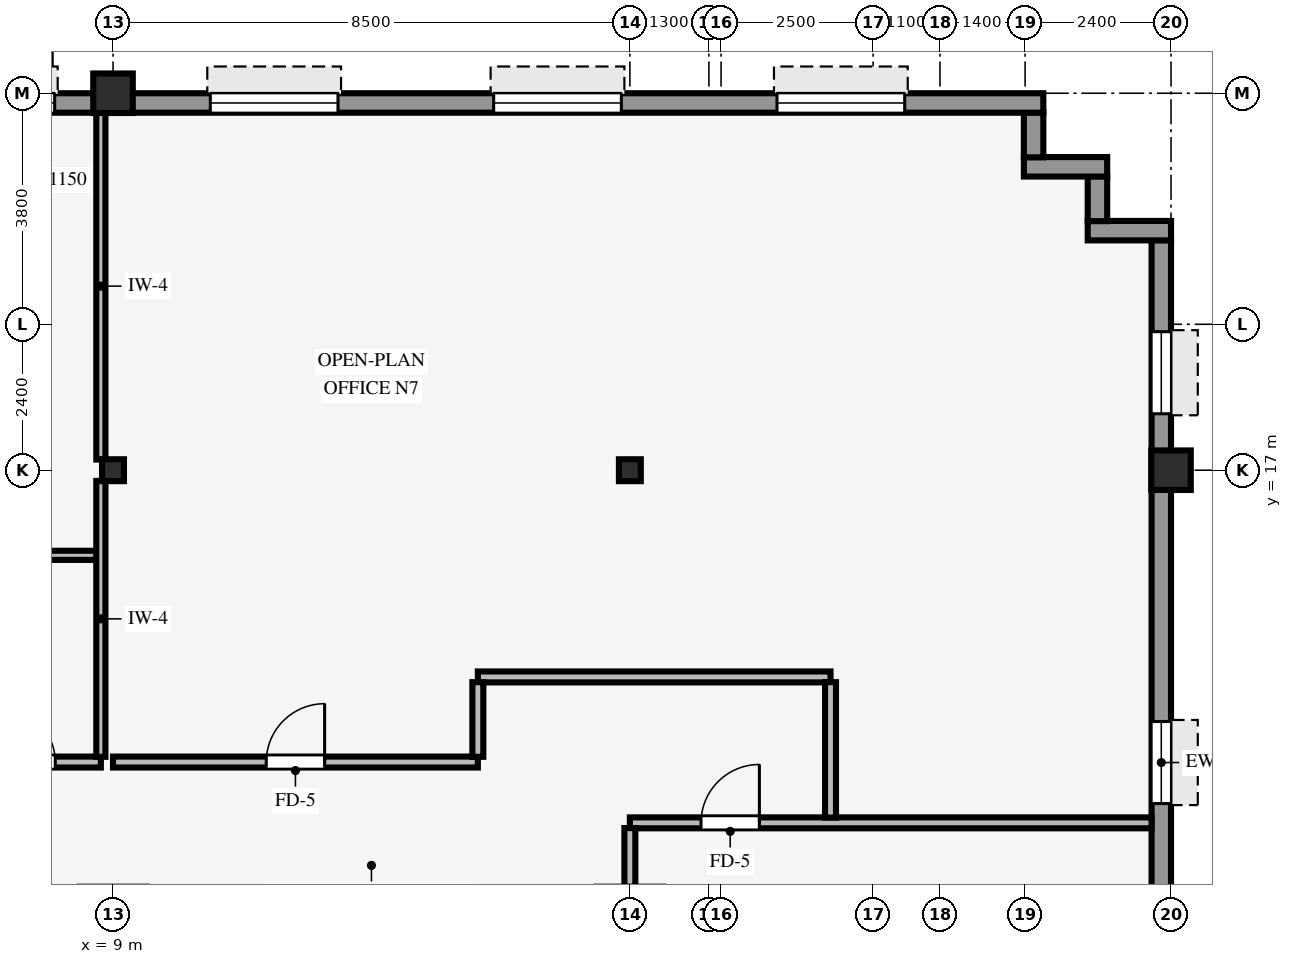
"""IFC4 building model, lengths in metres.
Left out: names, types, materials, properties, quantities, classifications, styles, units other than length and angle.
Written with IfcOpenShell. Run it as: python <this file> out.ifc"""

import sys

from ifc_helpers import new_model, si_unit, direction, frame, frame_2d, origin, origin_2d, place, context, subcontext, project, spatial, rectangle, hollow_rectangle, i_section, extrude, source, transform, mapped, element, fill, save


model = new_model("IFC4")
c1 = context("Model", 3, precision=1e-05, world=origin(), true_north=direction((0.0, 1.0)))
c2 = subcontext(c1, "Body", "Model", "MODEL_VIEW")
j1 = project(units=[si_unit("LENGTHUNIT", "METRE"), si_unit("PLANEANGLEUNIT", "RADIAN")], contexts=[c1])
p1 = place(None, origin())
s1 = spatial("IfcSite", under=j1, at=p1, CompositionType="ELEMENT")
p2 = place(p1, origin())
s2 = spatial("IfcBuilding", under=s1, at=p2, CompositionType="ELEMENT")
p3 = place(p2, frame((0.0, 0.0, 116.55)))
s3 = spatial("IfcBuildingStorey", under=s2, at=p3, CompositionType="ELEMENT", Elevation=116.55)
p4 = place(p3, frame((26.4, 17.0, -0.4), z_axis=(0.0, 0.0, 1.0), x_axis=(1.0, 0.0, 0.0)))
e1 = element("IfcColumn", 1, at=p4, inside=s3, PredefinedType="COLUMN", context=c2, shape_type="SweptSolid", body=[
    extrude(hollow_rectangle(XDim=0.65, YDim=0.65, WallThickness=0.04, InnerFilletRadius=0.04, OuterFilletRadius=0.08, at=origin_2d()), origin(), (0.0, 0.0, 1.0), 3.77),
])
p5 = place(p3, frame((9.0, 23.2, 0.0), z_axis=(0.0, 0.0, 1.0), x_axis=(1.0, 0.0, 0.0)))
e2 = element("IfcColumn", 2, at=p5, inside=s3, PredefinedType="COLUMN", context=c2, shape_type="SweptSolid", body=[
    extrude(hollow_rectangle(XDim=0.65, YDim=0.65, WallThickness=0.04, InnerFilletRadius=0.04, OuterFilletRadius=0.08, at=origin_2d()), origin(), (0.0, 0.0, 1.0), 3.37),
])
for number, where, z_axis, x_axis in (
    (3, (9.0, 17.0, 0.0), (0.0, 0.0, 1.0), (1.0, 0.0, 0.0)),
    (4, (17.5, 17.0, 0.0), (0.0, 0.0, 1.0), (1.0, 0.0, 0.0)),
):
    element("IfcColumn", number, at=place(p3, frame(where, z_axis=z_axis, x_axis=x_axis)), inside=s3, PredefinedType="COLUMN", context=c2, shape_type="SweptSolid", body=[
        extrude(i_section(OverallWidth=0.36, OverallDepth=0.36, WebThickness=0.021, FlangeThickness=0.021, FilletRadius=0.018, at=origin_2d()), origin(), (0.0, 0.0, 1.0), 3.37),
    ])
p6 = place(p3, frame((26.24, 3.6, 0.0), z_axis=(0.0, 0.0, 1.0), x_axis=(0.0, 1.0, 0.0)))
e5 = element("IfcWall", 5, at=p6, inside=s3, PredefinedType="STANDARD", context=c2, shape_type="SweptSolid", body=[
    extrude(rectangle(XDim=17.184, YDim=0.32, at=frame_2d((8.592, 0.0))), origin(), (0.0, 0.0, 1.0), 2.705),
])
p7 = place(p6, frame((2.856, 0.0, 0.8)))
e6 = element("IfcOpeningElement", 6, at=p7, cuts=e5, PredefinedType="OPENING", context=c2, shape_type="SweptSolid", body=[
    extrude(rectangle(XDim=1.35, YDim=1.56, at=frame_2d((0.675, 0.78))), frame((0.0, 0.17, 0.0), z_axis=(0.0, -1.0, 0.0), x_axis=(1.0, 0.0, 0.0)), (0.0, 0.0, 1.0), 0.34),
])
p8 = place(p6, frame((7.917, 0.0, 0.8)))
e7 = element("IfcOpeningElement", 7, at=p8, cuts=e5, PredefinedType="OPENING", context=c2, shape_type="SweptSolid", body=[
    extrude(rectangle(XDim=1.35, YDim=1.56, at=frame_2d((0.675, 0.78))), frame((0.0, 0.17, 0.0), z_axis=(0.0, -1.0, 0.0), x_axis=(1.0, 0.0, 0.0)), (0.0, 0.0, 1.0), 0.34),
])
p9 = place(p6, frame((14.328, 0.0, 0.8)))
e8 = element("IfcOpeningElement", 8, at=p9, cuts=e5, PredefinedType="OPENING", context=c2, shape_type="SweptSolid", body=[
    extrude(rectangle(XDim=1.35, YDim=1.56, at=frame_2d((0.675, 0.78))), frame((0.0, 0.17, 0.0), z_axis=(0.0, -1.0, 0.0), x_axis=(1.0, 0.0, 0.0)), (0.0, 0.0, 1.0), 0.34),
])
p10 = place(p3, frame((25.03, 20.94, 0.0), z_axis=(0.0, 0.0, 1.0), x_axis=(1.0, 0.0, 0.0)))
e9 = element("IfcWall", 9, at=p10, inside=s3, PredefinedType="STANDARD", context=c2, shape_type="SweptSolid", body=[
    extrude(rectangle(XDim=1.37, YDim=0.32, at=frame_2d((0.685, 0.0))), origin(), (0.0, 0.0, 1.0), 3.36),
])
p11 = place(p3, frame((25.19, 21.096, 0.0), z_axis=(0.0, 0.0, 1.0), x_axis=(0.0, 1.0, 0.0)))
e10 = element("IfcWall", 10, at=p11, inside=s3, PredefinedType="STANDARD", context=c2, shape_type="SweptSolid", body=[
    extrude(rectangle(XDim=0.738, YDim=0.32, at=frame_2d((0.369, 0.0))), origin(), (0.0, 0.0, 1.0), 3.36),
])
p12 = place(p3, frame((23.98, 21.99, 0.0), z_axis=(0.0, 0.0, 1.0), x_axis=(1.0, 0.0, 0.0)))
e11 = element("IfcWall", 11, at=p12, inside=s3, PredefinedType="STANDARD", context=c2, shape_type="SweptSolid", body=[
    extrude(rectangle(XDim=1.37, YDim=0.32, at=frame_2d((0.685, 0.0))), origin(), (0.0, 0.0, 1.0), 3.36),
])
p13 = place(p3, frame((24.14, 22.146, 0.0), z_axis=(0.0, 0.0, 1.0), x_axis=(0.0, 1.0, 0.0)))
e12 = element("IfcWall", 12, at=p13, inside=s3, PredefinedType="STANDARD", context=c2, shape_type="SweptSolid", body=[
    extrude(rectangle(XDim=0.738, YDim=0.32, at=frame_2d((0.369, 0.0))), origin(), (0.0, 0.0, 1.0), 3.36),
])
p14 = place(p3, frame((-24.3, 23.04, 0.0), z_axis=(0.0, 0.0, 1.0), x_axis=(1.0, 0.0, 0.0)))
e13 = element("IfcWall", 13, at=p14, inside=s3, PredefinedType="STANDARD", context=c2, shape_type="SweptSolid", body=[
    extrude(rectangle(XDim=48.6, YDim=0.32, at=frame_2d((24.3, 0.0))), origin(), (0.0, 0.0, 1.0), 2.705),
])
p15 = place(p14, frame((28.5, 0.0, 0.0)))
e14 = element("IfcOpeningElement", 14, at=p15, cuts=e13, PredefinedType="OPENING", context=c2, shape_type="SweptSolid", body=[
    extrude(rectangle(XDim=1.05, YDim=2.1, at=frame_2d((0.525, 1.05))), frame((0.0, 0.17, 0.0), z_axis=(0.0, -1.0, 0.0), x_axis=(1.0, 0.0, 0.0)), (0.0, 0.0, 1.0), 0.34),
])
p16 = place(p14, frame((2.73, 0.0, 0.8)))
e15 = element("IfcOpeningElement", 15, at=p16, cuts=e13, PredefinedType="OPENING", context=c2, shape_type="SweptSolid", body=[
    extrude(rectangle(XDim=2.1, YDim=1.56, at=frame_2d((1.05, 0.78))), frame((0.0, 0.17, 0.0), z_axis=(0.0, -1.0, 0.0), x_axis=(1.0, 0.0, 0.0)), (0.0, 0.0, 1.0), 0.34),
])
p17 = place(p14, frame((7.84, 0.0, 0.8)))
e16 = element("IfcOpeningElement", 16, at=p17, cuts=e13, PredefinedType="OPENING", context=c2, shape_type="SweptSolid", body=[
    extrude(rectangle(XDim=2.1, YDim=1.56, at=frame_2d((1.05, 0.78))), frame((0.0, 0.17, 0.0), z_axis=(0.0, -1.0, 0.0), x_axis=(1.0, 0.0, 0.0)), (0.0, 0.0, 1.0), 0.34),
])
p18 = place(p14, frame((20.92, 0.0, 0.8)))
e17 = element("IfcOpeningElement", 17, at=p18, cuts=e13, PredefinedType="OPENING", context=c2, shape_type="SweptSolid", body=[
    extrude(rectangle(XDim=2.1, YDim=1.56, at=frame_2d((1.05, 0.78))), frame((0.0, 0.17, 0.0), z_axis=(0.0, -1.0, 0.0), x_axis=(1.0, 0.0, 0.0)), (0.0, 0.0, 1.0), 0.34),
])
p19 = place(p14, frame((25.58, 0.0, 0.8)))
e18 = element("IfcOpeningElement", 18, at=p19, cuts=e13, PredefinedType="OPENING", context=c2, shape_type="SweptSolid", body=[
    extrude(rectangle(XDim=2.1, YDim=1.56, at=frame_2d((1.05, 0.78))), frame((0.0, 0.17, 0.0), z_axis=(0.0, -1.0, 0.0), x_axis=(1.0, 0.0, 0.0)), (0.0, 0.0, 1.0), 0.34),
])
p20 = place(p14, frame((30.24, 0.0, 0.8)))
e19 = element("IfcOpeningElement", 19, at=p20, cuts=e13, PredefinedType="OPENING", context=c2, shape_type="SweptSolid", body=[
    extrude(rectangle(XDim=2.1, YDim=1.56, at=frame_2d((1.05, 0.78))), frame((0.0, 0.17, 0.0), z_axis=(0.0, -1.0, 0.0), x_axis=(1.0, 0.0, 0.0)), (0.0, 0.0, 1.0), 0.34),
])
p21 = place(p14, frame((34.9, 0.0, 0.8)))
e20 = element("IfcOpeningElement", 20, at=p21, cuts=e13, PredefinedType="OPENING", context=c2, shape_type="SweptSolid", body=[
    extrude(rectangle(XDim=2.1, YDim=1.56, at=frame_2d((1.05, 0.78))), frame((0.0, 0.17, 0.0), z_axis=(0.0, -1.0, 0.0), x_axis=(1.0, 0.0, 0.0)), (0.0, 0.0, 1.0), 0.34),
])
p22 = place(p14, frame((39.56, 0.0, 0.8)))
e21 = element("IfcOpeningElement", 21, at=p22, cuts=e13, PredefinedType="OPENING", context=c2, shape_type="SweptSolid", body=[
    extrude(rectangle(XDim=2.1, YDim=1.56, at=frame_2d((1.05, 0.78))), frame((0.0, 0.17, 0.0), z_axis=(0.0, -1.0, 0.0), x_axis=(1.0, 0.0, 0.0)), (0.0, 0.0, 1.0), 0.34),
])
p23 = place(p14, frame((44.22, 0.0, 0.8)))
e22 = element("IfcOpeningElement", 22, at=p23, cuts=e13, PredefinedType="OPENING", context=c2, shape_type="SweptSolid", body=[
    extrude(rectangle(XDim=2.1, YDim=1.56, at=frame_2d((1.05, 0.78))), frame((0.0, 0.17, 0.0), z_axis=(0.0, -1.0, 0.0), x_axis=(1.0, 0.0, 0.0)), (0.0, 0.0, 1.0), 0.34),
])
p24 = place(p3, frame((17.5, 11.2, 0.0), z_axis=(0.0, 0.0, 1.0), x_axis=(1.0, 0.0, 0.0)))
e23 = element("IfcWall", 23, at=p24, inside=s3, PredefinedType="PARTITIONING", context=c2, shape_type="SweptSolid", body=[
    extrude(rectangle(XDim=8.58, YDim=0.18, at=frame_2d((4.29, 0.0))), origin(), (0.0, 0.0, 1.0), 3.36),
])
p25 = place(p24, frame((1.17, 0.0, 0.0)))
e24 = element("IfcOpeningElement", 24, at=p25, cuts=e23, PredefinedType="OPENING", context=c2, shape_type="SweptSolid", body=[
    extrude(rectangle(XDim=0.96, YDim=2.1, at=frame_2d((0.48, 1.05))), frame((0.0, 0.1, 0.0), z_axis=(0.0, -1.0, 0.0), x_axis=(1.0, 0.0, 0.0)), (0.0, 0.0, 1.0), 0.2),
])
p26 = place(p3, frame((-15.0, 12.2, 0.0), z_axis=(0.0, 0.0, 1.0), x_axis=(1.0, 0.0, 0.0)))
e25 = element("IfcWall", 25, at=p26, inside=s3, PredefinedType="PARTITIONING", context=c2, shape_type="SweptSolid", body=[
    extrude(rectangle(XDim=23.8, YDim=0.18, at=frame_2d((11.9, 0.0))), origin(), (0.0, 0.0, 1.0), 3.36),
])
p27 = place(p26, frame((5.525, 0.0, 0.0)))
e26 = element("IfcOpeningElement", 26, at=p27, cuts=e25, PredefinedType="OPENING", context=c2, shape_type="SweptSolid", body=[
    extrude(rectangle(XDim=0.96, YDim=2.1, at=frame_2d((0.48, 1.05))), frame((0.0, 0.1, 0.0), z_axis=(0.0, -1.0, 0.0), x_axis=(1.0, 0.0, 0.0)), (0.0, 0.0, 1.0), 0.2),
])
p28 = place(p26, frame((1.115, 0.0, 0.0)))
e27 = element("IfcOpeningElement", 27, at=p28, cuts=e25, PredefinedType="OPENING", context=c2, shape_type="SweptSolid", body=[
    extrude(rectangle(XDim=0.96, YDim=2.1, at=frame_2d((0.48, 1.05))), frame((0.0, 0.1, 0.0), z_axis=(0.0, -1.0, 0.0), x_axis=(1.0, 0.0, 0.0)), (0.0, 0.0, 1.0), 0.2),
])
p29 = place(p26, frame((9.83, 0.0, 0.0)))
e28 = element("IfcOpeningElement", 28, at=p29, cuts=e25, PredefinedType="OPENING", context=c2, shape_type="SweptSolid", body=[
    extrude(rectangle(XDim=0.96, YDim=2.1, at=frame_2d((0.48, 1.05))), frame((0.0, 0.1, 0.0), z_axis=(0.0, -1.0, 0.0), x_axis=(1.0, 0.0, 0.0)), (0.0, 0.0, 1.0), 0.2),
])
p30 = place(p26, frame((19.65, 0.0, 0.0)))
e29 = element("IfcOpeningElement", 29, at=p30, cuts=e25, PredefinedType="OPENING", context=c2, shape_type="SweptSolid", body=[
    extrude(rectangle(XDim=0.9, YDim=2.1, at=frame_2d((0.45, 1.05))), frame((0.0, 0.1, 0.0), z_axis=(0.0, -1.0, 0.0), x_axis=(1.0, 0.0, 0.0)), (0.0, 0.0, 1.0), 0.2),
])
p31 = place(p26, frame((17.05, 0.0, 0.0)))
e30 = element("IfcOpeningElement", 30, at=p31, cuts=e25, PredefinedType="OPENING", context=c2, shape_type="SweptSolid", body=[
    extrude(rectangle(XDim=0.9, YDim=2.1, at=frame_2d((0.45, 1.05))), frame((0.0, 0.1, 0.0), z_axis=(0.0, -1.0, 0.0), x_axis=(1.0, 0.0, 0.0)), (0.0, 0.0, 1.0), 0.2),
])
p32 = place(p26, frame((22.15, 0.0, 0.0)))
e31 = element("IfcOpeningElement", 31, at=p32, cuts=e25, PredefinedType="OPENING", context=c2, shape_type="SweptSolid", body=[
    extrude(rectangle(XDim=0.9, YDim=2.1, at=frame_2d((0.45, 1.05))), frame((0.0, 0.1, 0.0), z_axis=(0.0, -1.0, 0.0), x_axis=(1.0, 0.0, 0.0)), (0.0, 0.0, 1.0), 0.2),
])
p33 = place(p26, frame((14.72, 0.0, 0.0)))
e32 = element("IfcOpeningElement", 32, at=p33, cuts=e25, PredefinedType="OPENING", context=c2, shape_type="SweptSolid", body=[
    extrude(rectangle(XDim=0.96, YDim=2.1, at=frame_2d((0.48, 1.05))), frame((0.0, 0.1, 0.0), z_axis=(0.0, -1.0, 0.0), x_axis=(1.0, 0.0, 0.0)), (0.0, 0.0, 1.0), 0.2),
])
p34 = place(p3, frame((9.0, 12.2, 0.0), z_axis=(0.0, 0.0, 1.0), x_axis=(1.0, 0.0, 0.0)))
e33 = element("IfcWall", 33, at=p34, inside=s3, PredefinedType="PARTITIONING", context=c2, shape_type="SweptSolid", body=[
    extrude(rectangle(XDim=6.0, YDim=0.18, at=frame_2d((3.0, 0.0))), origin(), (0.0, 0.0, 1.0), 3.36),
])
p35 = place(p34, frame((2.52, 0.0, 0.0)))
e34 = element("IfcOpeningElement", 34, at=p35, cuts=e33, PredefinedType="OPENING", context=c2, shape_type="SweptSolid", body=[
    extrude(rectangle(XDim=0.96, YDim=2.1, at=frame_2d((0.48, 1.05))), frame((0.0, 0.1, 0.0), z_axis=(0.0, -1.0, 0.0), x_axis=(1.0, 0.0, 0.0)), (0.0, 0.0, 1.0), 0.2),
])
p36 = place(p3, frame((15.0, 13.6, 0.0), z_axis=(0.0, 0.0, 1.0), x_axis=(1.0, 0.0, 0.0)))
e35 = element("IfcWall", 35, at=p36, inside=s3, PredefinedType="PARTITIONING", context=c2, shape_type="SweptSolid", body=[
    extrude(rectangle(XDim=5.8, YDim=0.18, at=frame_2d((2.9, 0.0))), origin(), (0.0, 0.0, 1.0), 2.998),
])
p37 = place(p3, frame((1.2, 15.6, 0.0), z_axis=(0.0, 0.0, 1.0), x_axis=(1.0, 0.0, 0.0)))
e36 = element("IfcWall", 36, at=p37, inside=s3, PredefinedType="PARTITIONING", context=c2, shape_type="SweptSolid", body=[
    extrude(rectangle(XDim=7.529, YDim=0.15, at=frame_2d((3.765, 0.0))), origin(), (0.0, 0.0, 1.0), 3.36),
])
p38 = place(p3, frame((8.8, 12.286, 0.0), z_axis=(0.0, 0.0, 1.0), x_axis=(0.0, 1.0, 0.0)))
e37 = element("IfcWall", 37, at=p38, inside=s3, PredefinedType="PARTITIONING", context=c2, shape_type="SweptSolid", body=[
    extrude(rectangle(XDim=4.538, YDim=0.15, at=frame_2d((2.269, 0.0))), origin(), (0.0, 0.0, 1.0), 2.738),
])
p39 = place(p3, frame((8.8, 17.176, 0.0), z_axis=(0.0, 0.0, 1.0), x_axis=(0.0, 1.0, 0.0)))
e38 = element("IfcWall", 38, at=p39, inside=s3, PredefinedType="PARTITIONING", context=c2, shape_type="SweptSolid", body=[
    extrude(rectangle(XDim=5.703, YDim=0.15, at=frame_2d((2.852, 0.0))), origin(), (0.0, 0.0, 1.0), 2.738),
])
p40 = place(p3, frame((15.0, 12.286, 0.0), z_axis=(0.0, 0.0, 1.0), x_axis=(0.0, 1.0, 0.0)))
e39 = element("IfcWall", 39, at=p40, inside=s3, PredefinedType="PARTITIONING", context=c2, shape_type="SweptSolid", body=[
    extrude(rectangle(XDim=1.228, YDim=0.18, at=frame_2d((0.614, 0.0))), origin(), (0.0, 0.0, 1.0), 3.36),
])
p41 = place(p3, frame((17.5, 10.146, 0.0), z_axis=(0.0, 0.0, 1.0), x_axis=(0.0, 1.0, 0.0)))
e40 = element("IfcWall", 40, at=p41, inside=s3, PredefinedType="PARTITIONING", context=c2, shape_type="SweptSolid", body=[
    extrude(rectangle(XDim=0.968, YDim=0.18, at=frame_2d((0.484, 0.0))), origin(), (0.0, 0.0, 1.0), 2.738),
])
p42 = place(p3, frame((20.8, 11.286, 0.0), z_axis=(0.0, 0.0, 1.0), x_axis=(0.0, 1.0, 0.0)))
e41 = element("IfcWall", 41, at=p42, inside=s3, PredefinedType="PARTITIONING", context=c2, shape_type="SweptSolid", body=[
    extrude(rectangle(XDim=2.228, YDim=0.18, at=frame_2d((1.114, 0.0))), origin(), (0.0, 0.0, 1.0), 3.36),
])
m1 = source(origin(), c2, "Body", "SweptSolid", [
    extrude(rectangle(XDim=1.35, YDim=1.56, at=frame_2d((0.675, 0.78))), frame((0.0, 0.03, 0.0), z_axis=(0.0, -1.0, 0.0), x_axis=(1.0, 0.0, 0.0)), (0.0, 0.0, 1.0), 0.06),
])
p43 = place(p8, origin())
e42 = element("IfcWindow", 42, at=p43, inside=s3, PartitioningType="SINGLE_PANEL", PredefinedType="WINDOW", context=c2, shape_type="MappedRepresentation", body=[
    mapped(m1, transform((0.0, 0.0, 0.0), scale=1.0)),
])
fill(e7, e42)
p44 = place(p9, origin())
e43 = element("IfcWindow", 43, at=p44, inside=s3, PartitioningType="SINGLE_PANEL", PredefinedType="WINDOW", context=c2, shape_type="MappedRepresentation", body=[
    mapped(m1, transform((0.0, 0.0, 0.0), scale=1.0)),
])
fill(e8, e43)
m2 = source(origin(), c2, "Body", "SweptSolid", [
    extrude(rectangle(XDim=2.1, YDim=1.56, at=frame_2d((1.05, 0.78))), frame((0.0, 0.03, 0.0), z_axis=(0.0, -1.0, 0.0), x_axis=(1.0, 0.0, 0.0)), (0.0, 0.0, 1.0), 0.06),
])
p45 = place(p20, origin())
e44 = element("IfcWindow", 44, at=p45, inside=s3, PartitioningType="SINGLE_PANEL", PredefinedType="WINDOW", context=c2, shape_type="MappedRepresentation", body=[
    mapped(m2, transform((0.0, 0.0, 0.0), scale=1.0)),
])
fill(e19, e44)
p46 = place(p21, origin())
e45 = element("IfcWindow", 45, at=p46, inside=s3, PartitioningType="SINGLE_PANEL", PredefinedType="WINDOW", context=c2, shape_type="MappedRepresentation", body=[
    mapped(m2, transform((0.0, 0.0, 0.0), scale=1.0)),
])
fill(e20, e45)
p47 = place(p22, origin())
e46 = element("IfcWindow", 46, at=p47, inside=s3, PartitioningType="SINGLE_PANEL", PredefinedType="WINDOW", context=c2, shape_type="MappedRepresentation", body=[
    mapped(m2, transform((0.0, 0.0, 0.0), scale=1.0)),
])
fill(e21, e46)
p48 = place(p23, origin())
e47 = element("IfcWindow", 47, at=p48, inside=s3, PartitioningType="SINGLE_PANEL", PredefinedType="WINDOW", context=c2, shape_type="MappedRepresentation", body=[
    mapped(m2, transform((0.0, 0.0, 0.0), scale=1.0)),
])
fill(e22, e47)
m3 = source(origin(), c2, "Body", "SweptSolid", [
    extrude(rectangle(XDim=0.96, YDim=2.1, at=frame_2d((0.48, 1.05))), frame((0.0, 0.025, 0.0), z_axis=(0.0, -1.0, 0.0), x_axis=(1.0, 0.0, 0.0)), (0.0, 0.0, 1.0), 0.05),
])
p49 = place(p35, origin())
e48 = element("IfcDoor", 48, at=p49, inside=s3, OperationType="SINGLE_SWING_RIGHT", PredefinedType="DOOR", context=c2, shape_type="MappedRepresentation", body=[
    mapped(m3, transform((0.0, 0.0, 0.0), scale=1.0)),
])
fill(e34, e48)
p50 = place(p25, origin())
e49 = element("IfcDoor", 49, at=p50, inside=s3, OperationType="SINGLE_SWING_RIGHT", PredefinedType="DOOR", context=c2, shape_type="MappedRepresentation", body=[
    mapped(m3, transform((0.0, 0.0, 0.0), scale=1.0)),
])
fill(e24, e49)
m4 = source(origin(), c2, "Body", "SweptSolid", [
    extrude(rectangle(XDim=0.9, YDim=2.1, at=frame_2d((0.45, 1.05))), frame((0.0, 0.025, 0.0), z_axis=(0.0, -1.0, 0.0), x_axis=(1.0, 0.0, 0.0)), (0.0, 0.0, 1.0), 0.05),
])
p51 = place(p32, origin())
e50 = element("IfcDoor", 50, at=p51, inside=s3, OperationType="SINGLE_SWING_LEFT", PredefinedType="DOOR", context=c2, shape_type="MappedRepresentation", body=[
    mapped(m4, transform((0.0, 0.0, 0.0), scale=1.0)),
])
fill(e31, e50)
save(model, sys.argv[1])
